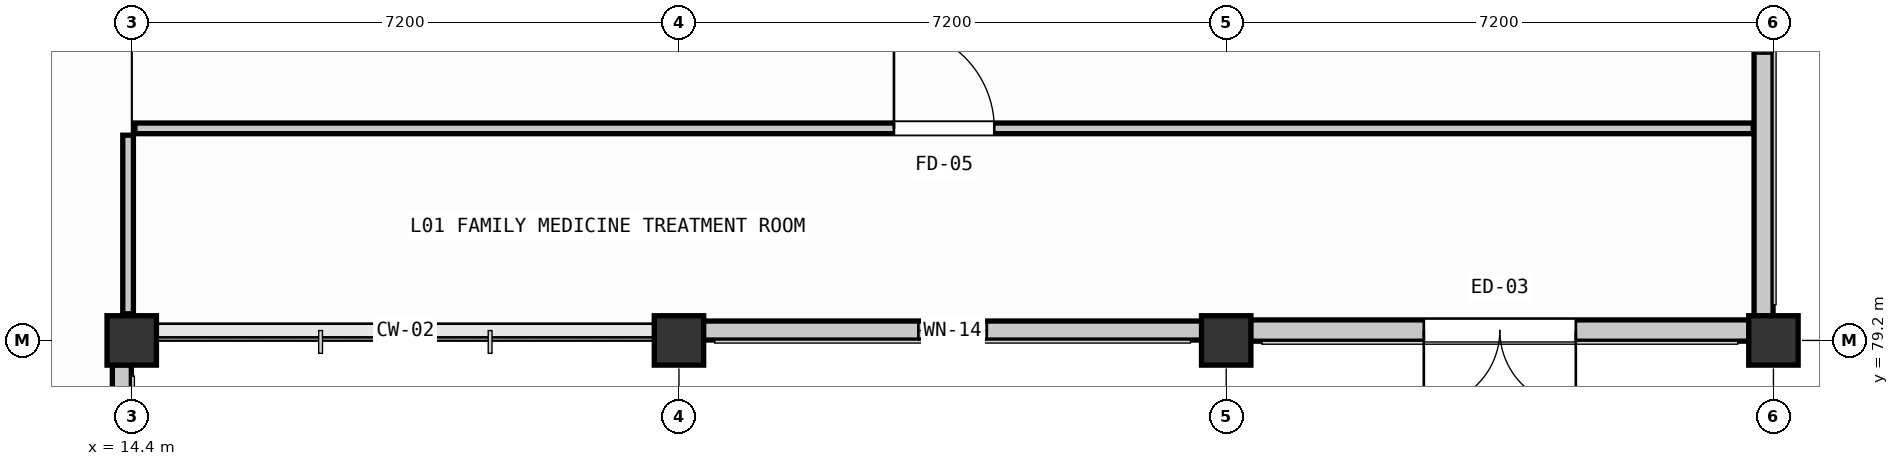
"""IFC4 building model, lengths in metres.
Left out: names, types, materials, properties, quantities, classifications, styles, units other than length and angle.
Written with IfcOpenShell. Run it as: python <this file> out.ifc"""

import sys

from ifc_helpers import new_model, si_unit, direction, frame, frame_2d, origin, origin_2d, place, context, subcontext, project, spatial, rectangle, extrude, element, fill, save


model = new_model("IFC4")
c1 = context("Model", 3, precision=1e-05, world=origin(), true_north=direction((0.0, 1.0)))
c2 = subcontext(c1, "Body", "Model", "MODEL_VIEW")
j1 = project(units=[si_unit("LENGTHUNIT", "METRE"), si_unit("PLANEANGLEUNIT", "RADIAN")], contexts=[c1])
p1 = place(None, origin())
s1 = spatial("IfcSite", under=j1, at=p1, CompositionType="ELEMENT")
p2 = place(p1, origin())
s2 = spatial("IfcBuilding", under=s1, at=p2, CompositionType="ELEMENT")
p3 = place(p2, origin())
s3 = spatial("IfcBuildingStorey", under=s2, at=p3, CompositionType="ELEMENT", Elevation=0.0)
for number, where, z_axis, x_axis in (
    (1, (14.4, 79.2, -0.25), (0.0, 0.0, 1.0), (1.0, 0.0, 0.0)),
    (2, (21.6, 79.2, -0.25), (0.0, 0.0, 1.0), (1.0, 0.0, 0.0)),
    (3, (28.8, 79.2, -0.25), (0.0, 0.0, 1.0), (1.0, 0.0, 0.0)),
    (4, (36.0, 79.2, -0.25), (0.0, 0.0, 1.0), (1.0, 0.0, 0.0)),
):
    element("IfcColumn", number, at=place(p3, frame(where, z_axis=z_axis, x_axis=x_axis)), inside=s3, PredefinedType="COLUMN", context=c2, shape_type="SweptSolid", body=[
        extrude(rectangle(XDim=0.65, YDim=0.65, at=origin_2d()), origin(), (0.0, 0.0, 1.0), 4.81),
    ])
p4 = place(p3, frame((35.87, 86.08, 0.0), z_axis=(0.0, 0.0, 1.0), x_axis=(0.0, -1.0, 0.0)))
e5 = element("IfcWall", 5, at=p4, inside=s3, PredefinedType="SOLIDWALL", context=c2, shape_type="SweptSolid", body=[
    extrude(rectangle(XDim=6.56, YDim=0.25, at=frame_2d((3.28, 0.0))), origin(), (0.0, 0.0, 1.0), 3.76),
])
p5 = place(p4, frame((2.355, 0.0, 1.5)))
e6 = element("IfcOpeningElement", 6, at=p5, cuts=e5, PredefinedType="OPENING", context=c2, shape_type="SweptSolid", body=[
    extrude(rectangle(XDim=0.75, YDim=0.95, at=frame_2d((0.375, 0.475))), frame((0.0, 0.135, 0.0), z_axis=(0.0, -1.0, 0.0), x_axis=(1.0, 0.0, 0.0)), (0.0, 0.0, 1.0), 0.27),
])
p6 = place(p3, frame((35.68, 79.33, 0.0), z_axis=(0.0, 0.0, 1.0), x_axis=(-1.0, 0.0, 0.0)))
e7 = element("IfcWall", 7, at=p6, inside=s3, PredefinedType="SOLIDWALL", context=c2, shape_type="SweptSolid", body=[
    extrude(rectangle(XDim=6.56, YDim=0.28, at=frame_2d((3.28, 0.0))), origin(), (0.0, 0.0, 1.0), 3.76),
])
p7 = place(p6, frame((2.28, 0.0, 0.0)))
e8 = element("IfcOpeningElement", 8, at=p7, cuts=e7, PredefinedType="OPENING", context=c2, shape_type="SweptSolid", body=[
    extrude(rectangle(XDim=2.0, YDim=2.4, at=frame_2d((1.0, 1.2))), frame((0.0, 0.15, 0.0), z_axis=(0.0, -1.0, 0.0), x_axis=(1.0, 0.0, 0.0)), (0.0, 0.0, 1.0), 0.3),
])
p8 = place(p3, frame((28.48, 79.33, 0.0), z_axis=(0.0, 0.0, 1.0), x_axis=(-1.0, 0.0, 0.0)))
e9 = element("IfcWall", 9, at=p8, inside=s3, PredefinedType="SOLIDWALL", context=c2, shape_type="SweptSolid", body=[
    extrude(rectangle(XDim=6.56, YDim=0.25, at=frame_2d((3.28, 0.0))), origin(), (0.0, 0.0, 1.0), 3.76),
])
p9 = place(p8, frame((2.83, 0.0, 1.5)))
e10 = element("IfcOpeningElement", 10, at=p9, cuts=e9, PredefinedType="OPENING", context=c2, shape_type="SweptSolid", body=[
    extrude(rectangle(XDim=0.9, YDim=0.95, at=frame_2d((0.45, 0.475))), frame((0.0, 0.135, 0.0), z_axis=(0.0, -1.0, 0.0), x_axis=(1.0, 0.0, 0.0)), (0.0, 0.0, 1.0), 0.27),
])
p10 = place(p3, frame((14.27, 78.88, 0.0), z_axis=(0.0, 0.0, 1.0), x_axis=(0.0, -1.0, 0.0)))
e11 = element("IfcWall", 11, at=p10, inside=s3, PredefinedType="SOLIDWALL", context=c2, shape_type="SweptSolid", body=[
    extrude(rectangle(XDim=6.56, YDim=0.25, at=frame_2d((3.28, 0.0))), origin(), (0.0, 0.0, 1.0), 3.76),
])
p11 = place(p10, frame((2.755, 0.0, 1.5)))
e12 = element("IfcOpeningElement", 12, at=p11, cuts=e11, PredefinedType="OPENING", context=c2, shape_type="SweptSolid", body=[
    extrude(rectangle(XDim=1.05, YDim=0.95, at=frame_2d((0.525, 0.475))), frame((0.0, 0.135, 0.0), z_axis=(0.0, -1.0, 0.0), x_axis=(1.0, 0.0, 0.0)), (0.0, 0.0, 1.0), 0.27),
])
p12 = place(p3, frame((14.352, 79.55, 0.0), z_axis=(0.0, 0.0, 1.0), x_axis=(0.0, 1.0, 0.0)))
e13 = element("IfcWall", 13, at=p12, inside=s3, PredefinedType="PARTITIONING", context=c2, shape_type="SweptSolid", body=[
    extrude(rectangle(XDim=2.35, YDim=0.14, at=frame_2d((1.175, 0.0))), origin(), (0.0, 0.0, 1.0), 3.76),
])
p13 = place(p3, frame((14.442, 81.99, 0.0), z_axis=(0.0, 0.0, 1.0), x_axis=(1.0, 0.0, 0.0)))
e14 = element("IfcWall", 14, at=p13, inside=s3, PredefinedType="PARTITIONING", context=c2, shape_type="SweptSolid", body=[
    extrude(rectangle(XDim=21.293, YDim=0.14, at=frame_2d((10.646, 0.0))), origin(), (0.0, 0.0, 1.0), 3.86),
])
p14 = place(p13, frame((9.987, 0.0, 0.0)))
e15 = element("IfcOpeningElement", 15, at=p14, cuts=e14, PredefinedType="OPENING", context=c2, shape_type="SweptSolid", body=[
    extrude(rectangle(XDim=1.32, YDim=2.2, at=frame_2d((0.66, 1.1))), frame((0.0, 0.08, 0.0), z_axis=(0.0, -1.0, 0.0), x_axis=(1.0, 0.0, 0.0)), (0.0, 0.0, 1.0), 0.16),
])
p15 = place(p5, origin())
e16 = element("IfcWindow", 16, at=p15, inside=s3, PartitioningType="SINGLE_PANEL", PredefinedType="WINDOW", context=c2, shape_type="SweptSolid", body=[
    extrude(rectangle(XDim=0.75, YDim=0.95, at=frame_2d((0.375, 0.475))), frame((0.0, 0.03, 0.0), z_axis=(0.0, -1.0, 0.0), x_axis=(1.0, 0.0, 0.0)), (0.0, 0.0, 1.0), 0.06),
])
fill(e6, e16)
p16 = place(p7, origin())
e17 = element("IfcDoor", 17, at=p16, inside=s3, OperationType="DOUBLE_DOOR_SINGLE_SWING", PredefinedType="DOOR", context=c2, shape_type="SweptSolid", body=[
    extrude(rectangle(XDim=2.0, YDim=2.4, at=frame_2d((1.0, 1.2))), frame((0.0, 0.025, 0.0), z_axis=(0.0, -1.0, 0.0), x_axis=(1.0, 0.0, 0.0)), (0.0, 0.0, 1.0), 0.05),
])
fill(e8, e17)
p17 = place(p9, origin())
e18 = element("IfcWindow", 18, at=p17, inside=s3, PartitioningType="SINGLE_PANEL", PredefinedType="WINDOW", context=c2, shape_type="SweptSolid", body=[
    extrude(rectangle(XDim=0.9, YDim=0.95, at=frame_2d((0.45, 0.475))), frame((0.0, 0.03, 0.0), z_axis=(0.0, -1.0, 0.0), x_axis=(1.0, 0.0, 0.0)), (0.0, 0.0, 1.0), 0.06),
])
fill(e10, e18)
p18 = place(p14, origin())
e19 = element("IfcDoor", 19, at=p18, inside=s3, OperationType="SINGLE_SWING_LEFT", PredefinedType="DOOR", context=c2, shape_type="SweptSolid", body=[
    extrude(rectangle(XDim=1.32, YDim=2.2, at=frame_2d((0.66, 1.1))), frame((0.0, 0.025, 0.0), z_axis=(0.0, -1.0, 0.0), x_axis=(1.0, 0.0, 0.0)), (0.0, 0.0, 1.0), 0.05),
])
fill(e15, e19)
save(model, sys.argv[1])
